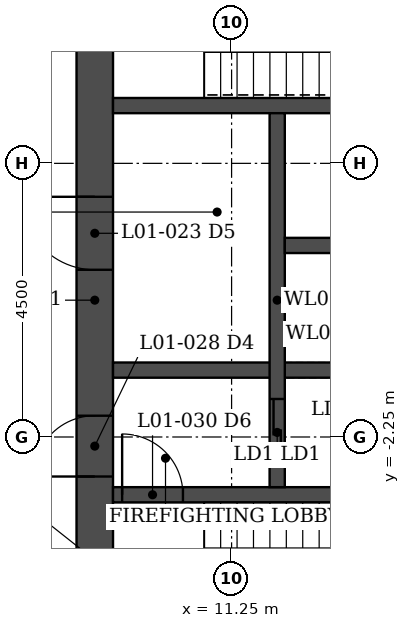
"""IFC4 building model, lengths in metres.
Left out: names, types, materials, properties, quantities, classifications, styles, units other than length and angle.
Written with IfcOpenShell. Run it as: python <this file> out.ifc"""

import sys

from ifc_helpers import new_model, si_unit, direction, frame, frame_2d, origin, place, context, subcontext, project, spatial, rectangle, extrude, element, fill, save


model = new_model("IFC4")
c1 = context("Model", 3, precision=1e-05, world=origin(), true_north=direction((0.0, 1.0)))
c2 = subcontext(c1, "Body", "Model", "MODEL_VIEW")
j1 = project(units=[si_unit("LENGTHUNIT", "METRE"), si_unit("PLANEANGLEUNIT", "RADIAN")], contexts=[c1])
p1 = place(None, origin())
s1 = spatial("IfcSite", under=j1, at=p1, CompositionType="ELEMENT")
p2 = place(p1, origin())
s2 = spatial("IfcBuilding", under=s1, at=p2, CompositionType="ELEMENT")
p3 = place(p2, frame((0.0, 0.0, 6.0)))
s3 = spatial("IfcBuildingStorey", under=s2, at=p3, CompositionType="ELEMENT", Elevation=6.0)
p4 = place(p3, frame((9.0, -6.45, 0.0), z_axis=(0.0, 0.0, 1.0), x_axis=(0.0, 1.0, 0.0)))
e1 = element("IfcWall", 1, at=p4, inside=s3, PredefinedType="SHEAR", context=c2, shape_type="SweptSolid", body=[
    extrude(rectangle(XDim=12.9, YDim=0.6, at=frame_2d((6.45, 0.0))), origin(), (0.0, 0.0, 1.0), 5.0),
])
p5 = place(p4, frame((3.55, 0.0, 0.0)))
e2 = element("IfcOpeningElement", 2, at=p5, cuts=e1, PredefinedType="OPENING", context=c2, shape_type="SweptSolid", body=[
    extrude(rectangle(XDim=1.0, YDim=2.1, at=frame_2d((0.5, 1.05))), frame((0.0, 0.31, 0.0), z_axis=(0.0, -1.0, 0.0), x_axis=(1.0, 0.0, 0.0)), (0.0, 0.0, 1.0), 0.62),
])
p6 = place(p4, frame((6.95, 0.0, 0.0)))
e3 = element("IfcOpeningElement", 3, at=p6, cuts=e1, PredefinedType="OPENING", context=c2, shape_type="SweptSolid", body=[
    extrude(rectangle(XDim=1.2, YDim=2.1, at=frame_2d((0.6, 1.05))), frame((0.0, 0.31, 0.0), z_axis=(0.0, -1.0, 0.0), x_axis=(1.0, 0.0, 0.0)), (0.0, 0.0, 1.0), 0.62),
])
p7 = place(p4, frame((10.85, 0.0, 0.0)))
e4 = element("IfcOpeningElement", 4, at=p7, cuts=e1, PredefinedType="OPENING", context=c2, shape_type="SweptSolid", body=[
    extrude(rectangle(XDim=1.0, YDim=2.1, at=frame_2d((0.5, 1.05))), frame((0.0, 0.31, 0.0), z_axis=(0.0, -1.0, 0.0), x_axis=(1.0, 0.0, 0.0)), (0.0, 0.0, 1.0), 0.62),
])
p8 = place(p3, frame((9.3, -3.2, 0.0), z_axis=(0.0, 0.0, 1.0), x_axis=(1.0, 0.0, 0.0)))
e5 = element("IfcWall", 5, at=p8, inside=s3, PredefinedType="SHEAR", context=c2, shape_type="SweptSolid", body=[
    extrude(rectangle(XDim=8.4, YDim=0.25, at=frame_2d((4.2, 0.0))), origin(), (0.0, 0.0, 1.0), 5.0),
])
p9 = place(p8, frame((0.15, 0.0, 0.0)))
e6 = element("IfcOpeningElement", 6, at=p9, cuts=e5, PredefinedType="OPENING", context=c2, shape_type="SweptSolid", body=[
    extrude(rectangle(XDim=1.0, YDim=2.1, at=frame_2d((0.5, 1.05))), frame((0.0, 0.135, 0.0), z_axis=(0.0, -1.0, 0.0), x_axis=(1.0, 0.0, 0.0)), (0.0, 0.0, 1.0), 0.27),
])
p10 = place(p3, frame((9.3, 3.2, 0.0), z_axis=(0.0, 0.0, 1.0), x_axis=(1.0, 0.0, 0.0)))
e7 = element("IfcWall", 7, at=p10, inside=s3, PredefinedType="SHEAR", context=c2, shape_type="SweptSolid", body=[
    extrude(rectangle(XDim=8.4, YDim=0.25, at=frame_2d((4.2, 0.0))), origin(), (0.0, 0.0, 1.0), 5.0),
])
p11 = place(p3, frame((9.3, -1.15, 0.0), z_axis=(0.0, 0.0, 1.0), x_axis=(1.0, 0.0, 0.0)))
e8 = element("IfcWall", 8, at=p11, inside=s3, PredefinedType="SHEAR", context=c2, shape_type="SweptSolid", body=[
    extrude(rectangle(XDim=5.375, YDim=0.25, at=frame_2d((2.688, 0.0))), origin(), (0.0, 0.0, 1.0), 5.0),
])
p12 = place(p3, frame((12.0, -3.075, 0.0), z_axis=(0.0, 0.0, 1.0), x_axis=(0.0, 1.0, 0.0)))
e9 = element("IfcWall", 9, at=p12, inside=s3, PredefinedType="SHEAR", context=c2, shape_type="SweptSolid", body=[
    extrude(rectangle(XDim=6.15, YDim=0.25, at=frame_2d((3.075, 0.0))), origin(), (0.0, 0.0, 1.0), 5.0),
])
p13 = place(p12, frame((0.35, 0.0, 0.0)))
e10 = element("IfcOpeningElement", 10, at=p13, cuts=e9, PredefinedType="OPENING", context=c2, shape_type="SweptSolid", body=[
    extrude(rectangle(XDim=1.1, YDim=2.1, at=frame_2d((0.55, 1.05))), frame((0.0, 0.135, 0.0), z_axis=(0.0, -1.0, 0.0), x_axis=(1.0, 0.0, 0.0)), (0.0, 0.0, 1.0), 0.27),
])
p14 = place(p3, frame((12.125, 0.9, 0.0), z_axis=(0.0, 0.0, 1.0), x_axis=(1.0, 0.0, 0.0)))
e11 = element("IfcWall", 11, at=p14, inside=s3, PredefinedType="SHEAR", context=c2, shape_type="SweptSolid", body=[
    extrude(rectangle(XDim=2.55, YDim=0.25, at=frame_2d((1.275, 0.0))), origin(), (0.0, 0.0, 1.0), 5.0),
])
p15 = place(p5, origin())
e12 = element("IfcDoor", 12, at=p15, inside=s3, OperationType="SINGLE_SWING_LEFT", PredefinedType="DOOR", context=c2, shape_type="SweptSolid", body=[
    extrude(rectangle(XDim=1.0, YDim=2.1, at=frame_2d((0.5, 1.05))), frame((0.0, 0.025, 0.0), z_axis=(0.0, -1.0, 0.0), x_axis=(1.0, 0.0, 0.0)), (0.0, 0.0, 1.0), 0.05),
])
fill(e2, e12)
p16 = place(p9, origin())
e13 = element("IfcDoor", 13, at=p16, inside=s3, OperationType="SINGLE_SWING_LEFT", PredefinedType="DOOR", context=c2, shape_type="SweptSolid", body=[
    extrude(rectangle(XDim=1.0, YDim=2.1, at=frame_2d((0.5, 1.05))), frame((0.0, 0.025, 0.0), z_axis=(0.0, -1.0, 0.0), x_axis=(1.0, 0.0, 0.0)), (0.0, 0.0, 1.0), 0.05),
])
fill(e6, e13)
p17 = place(p6, origin())
e14 = element("IfcDoor", 14, at=p17, inside=s3, OperationType="SINGLE_SWING_RIGHT", PredefinedType="DOOR", context=c2, shape_type="SweptSolid", body=[
    extrude(rectangle(XDim=1.2, YDim=2.1, at=frame_2d((0.6, 1.05))), frame((0.0, 0.025, 0.0), z_axis=(0.0, -1.0, 0.0), x_axis=(1.0, 0.0, 0.0)), (0.0, 0.0, 1.0), 0.05),
])
fill(e3, e14)
p18 = place(p13, origin())
e15 = element("IfcDoor", 15, at=p18, inside=s3, OperationType="DOUBLE_DOOR_SLIDING", PredefinedType="DOOR", context=c2, shape_type="SweptSolid", body=[
    extrude(rectangle(XDim=1.1, YDim=2.1, at=frame_2d((0.55, 1.05))), frame((0.0, 0.025, 0.0), z_axis=(0.0, -1.0, 0.0), x_axis=(1.0, 0.0, 0.0)), (0.0, 0.0, 1.0), 0.05),
])
fill(e10, e15)
save(model, sys.argv[1])
